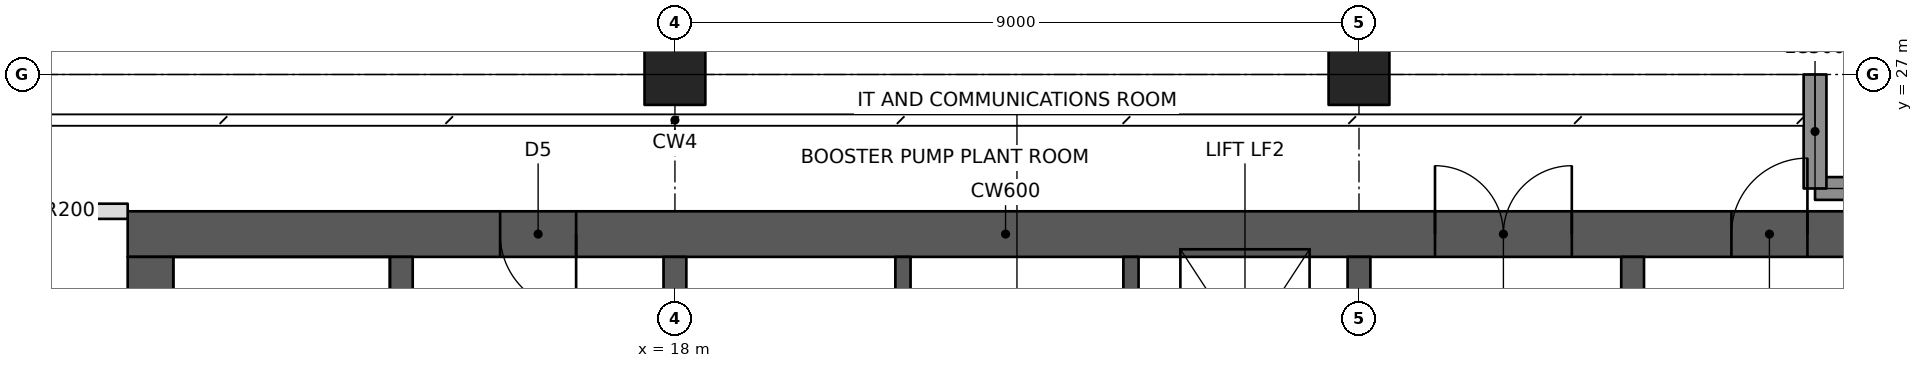
"""IFC4 building model, lengths in metres.
Left out: names, types, materials, properties, quantities, classifications, styles, units other than length and angle.
Written with IfcOpenShell. Run it as: python <this file> out.ifc"""

import sys

from ifc_helpers import new_model, si_unit, direction, frame, frame_2d, origin, origin_2d, place, context, subcontext, project, spatial, rectangle, hollow_rectangle, extrude, element, fill, save


model = new_model("IFC4")
c1 = context("Model", 3, precision=1e-05, world=origin(), true_north=direction((0.0, 1.0)))
c2 = subcontext(c1, "Body", "Model", "MODEL_VIEW")
j1 = project(units=[si_unit("LENGTHUNIT", "METRE"), si_unit("PLANEANGLEUNIT", "RADIAN")], contexts=[c1])
p1 = place(None, origin())
s1 = spatial("IfcSite", under=j1, at=p1, CompositionType="ELEMENT")
p2 = place(p1, origin())
s2 = spatial("IfcBuilding", under=s1, at=p2, CompositionType="ELEMENT")
p3 = place(p2, frame((0.0, 0.0, 274.8)))
s3 = spatial("IfcBuildingStorey", under=s2, at=p3, CompositionType="ELEMENT", Elevation=274.8)
for number, where, z_axis, x_axis in (
    (1, (18.0, 27.0, 0.0), (0.0, 0.0, 1.0), (1.0, 0.0, 0.0)),
    (2, (27.0, 27.0, 0.0), (0.0, 0.0, 1.0), (1.0, 0.0, 0.0)),
):
    element("IfcColumn", number, at=place(p3, frame(where, z_axis=z_axis, x_axis=x_axis)), inside=s3, PredefinedType="COLUMN", context=c2, shape_type="SweptSolid", body=[
        extrude(hollow_rectangle(XDim=0.8, YDim=0.8, WallThickness=0.025, at=origin_2d()), origin(), (0.0, 0.0, 1.0), 5.0),
    ])
p4 = place(p3, frame((10.8, 24.9, 0.0), z_axis=(0.0, 0.0, 1.0), x_axis=(1.0, 0.0, 0.0)))
e3 = element("IfcWall", 3, at=p4, inside=s3, PredefinedType="SHEAR", context=c2, shape_type="SweptSolid", body=[
    extrude(rectangle(XDim=23.4, YDim=0.6, at=frame_2d((11.7, 0.0))), origin(), (0.0, 0.0, 1.0), 4.7),
])
p5 = place(p4, frame((17.2, 0.0, 0.0)))
e4 = element("IfcOpeningElement", 4, at=p5, cuts=e3, PredefinedType="OPENING", context=c2, shape_type="SweptSolid", body=[
    extrude(rectangle(XDim=1.8, YDim=2.1, at=frame_2d((0.9, 1.05))), frame((0.0, 0.31, 0.0), z_axis=(0.0, -1.0, 0.0), x_axis=(1.0, 0.0, 0.0)), (0.0, 0.0, 1.0), 0.62),
])
p6 = place(p4, frame((21.1, 0.0, 0.0)))
e5 = element("IfcOpeningElement", 5, at=p6, cuts=e3, PredefinedType="OPENING", context=c2, shape_type="SweptSolid", body=[
    extrude(rectangle(XDim=1.0, YDim=2.1, at=frame_2d((0.5, 1.05))), frame((0.0, 0.31, 0.0), z_axis=(0.0, -1.0, 0.0), x_axis=(1.0, 0.0, 0.0)), (0.0, 0.0, 1.0), 0.62),
])
p7 = place(p4, frame((4.9, 0.0, 0.0)))
e6 = element("IfcOpeningElement", 6, at=p7, cuts=e3, PredefinedType="OPENING", context=c2, shape_type="SweptSolid", body=[
    extrude(rectangle(XDim=1.0, YDim=2.1, at=frame_2d((0.5, 1.05))), frame((0.0, 0.31, 0.0), z_axis=(0.0, -1.0, 0.0), x_axis=(1.0, 0.0, 0.0)), (0.0, 0.0, 1.0), 0.62),
])
p8 = place(p3, frame((11.1, 11.4, 0.0), z_axis=(0.0, 0.0, 1.0), x_axis=(0.0, 1.0, 0.0)))
e7 = element("IfcWall", 7, at=p8, inside=s3, PredefinedType="SHEAR", context=c2, shape_type="SweptSolid", body=[
    extrude(rectangle(XDim=13.2, YDim=0.6, at=frame_2d((6.6, 0.0))), origin(), (0.0, 0.0, 1.0), 4.7),
])
p9 = place(p3, frame((14.4, 11.4, 0.0), z_axis=(0.0, 0.0, 1.0), x_axis=(0.0, 1.0, 0.0)))
e8 = element("IfcWall", 8, at=p9, inside=s3, PredefinedType="SHEAR", context=c2, shape_type="SweptSolid", body=[
    extrude(rectangle(XDim=13.2, YDim=0.3, at=frame_2d((6.6, 0.0))), origin(), (0.0, 0.0, 1.0), 4.7),
])
p10 = place(p3, frame((18.0, 11.4, 0.0), z_axis=(0.0, 0.0, 1.0), x_axis=(0.0, 1.0, 0.0)))
e9 = element("IfcWall", 9, at=p10, inside=s3, PredefinedType="SHEAR", context=c2, shape_type="SweptSolid", body=[
    extrude(rectangle(XDim=13.2, YDim=0.3, at=frame_2d((6.6, 0.0))), origin(), (0.0, 0.0, 1.0), 4.7),
])
p11 = place(p10, frame((3.6, 0.0, 0.0)))
e10 = element("IfcOpeningElement", 10, at=p11, cuts=e9, PredefinedType="OPENING", context=c2, shape_type="SweptSolid", body=[
    extrude(rectangle(XDim=1.0, YDim=2.1, at=frame_2d((0.5, 1.05))), frame((0.0, 0.16, 0.0), z_axis=(0.0, -1.0, 0.0), x_axis=(1.0, 0.0, 0.0)), (0.0, 0.0, 1.0), 0.32),
])
p12 = place(p3, frame((27.0, 21.75, 0.0), z_axis=(0.0, 0.0, 1.0), x_axis=(0.0, 1.0, 0.0)))
e11 = element("IfcWall", 11, at=p12, inside=s3, PredefinedType="SHEAR", context=c2, shape_type="SweptSolid", body=[
    extrude(rectangle(XDim=2.85, YDim=0.3, at=frame_2d((1.425, 0.0))), origin(), (0.0, 0.0, 1.0), 4.7),
])
for number, where, z_axis, x_axis in (
    (12, (21.0, 21.75, 0.0), (0.0, 0.0, 1.0), (0.0, 1.0, 0.0)),
    (13, (24.0, 21.75, 0.0), (0.0, 0.0, 1.0), (0.0, 1.0, 0.0)),
):
    element("IfcWall", number, at=place(p3, frame(where, z_axis=z_axis, x_axis=x_axis)), inside=s3, PredefinedType="SHEAR", context=c2, shape_type="SweptSolid", body=[
        extrude(rectangle(XDim=2.85, YDim=0.2, at=frame_2d((1.425, 0.0))), origin(), (0.0, 0.0, 1.0), 4.7),
    ])
p13 = place(p3, frame((30.6, 11.4, 0.0), z_axis=(0.0, 0.0, 1.0), x_axis=(0.0, 1.0, 0.0)))
e14 = element("IfcWall", 14, at=p13, inside=s3, PredefinedType="SHEAR", context=c2, shape_type="SweptSolid", body=[
    extrude(rectangle(XDim=13.2, YDim=0.3, at=frame_2d((6.6, 0.0))), origin(), (0.0, 0.0, 1.0), 4.7),
])
p14 = place(p3, frame((34.5, 25.5, 0.0), z_axis=(0.0, 0.0, 1.0), x_axis=(-1.0, 0.0, 0.0)))
e15 = element("IfcWall", 15, at=p14, inside=s3, PredefinedType="SOLIDWALL", context=c2, shape_type="SweptSolid", body=[
    extrude(rectangle(XDim=1.5, YDim=0.3, at=frame_2d((0.75, 0.0))), origin(), (0.0, 0.0, 1.0), 4.7),
])
p15 = place(p3, frame((33.0, 25.5, 0.0), z_axis=(0.0, 0.0, 1.0), x_axis=(0.0, 1.0, 0.0)))
e16 = element("IfcWall", 16, at=p15, inside=s3, PredefinedType="SOLIDWALL", context=c2, shape_type="SweptSolid", body=[
    extrude(rectangle(XDim=1.5, YDim=0.3, at=frame_2d((0.75, 0.0))), origin(), (0.0, 0.0, 1.0), 3.92),
])
p16 = place(p3, frame((9.1, 25.2, 0.0), z_axis=(0.0, 0.0, 1.0), x_axis=(1.0, 0.0, 0.0)))
e17 = element("IfcWall", 17, at=p16, inside=s3, PredefinedType="PARTITIONING", context=c2, shape_type="SweptSolid", body=[
    extrude(rectangle(XDim=1.7, YDim=0.2, at=frame_2d((0.85, 0.0))), origin(), (0.0, 0.0, 1.0), 3.938),
])
p17 = place(p5, origin())
e18 = element("IfcDoor", 18, at=p17, inside=s3, OperationType="DOUBLE_DOOR_SINGLE_SWING", PredefinedType="DOOR", context=c2, shape_type="SweptSolid", body=[
    extrude(rectangle(XDim=1.8, YDim=2.1, at=frame_2d((0.9, 1.05))), frame((0.0, 0.025, 0.0), z_axis=(0.0, -1.0, 0.0), x_axis=(1.0, 0.0, 0.0)), (0.0, 0.0, 1.0), 0.05),
])
fill(e4, e18)
p18 = place(p6, origin())
e19 = element("IfcDoor", 19, at=p18, inside=s3, OperationType="SINGLE_SWING_RIGHT", PredefinedType="DOOR", context=c2, shape_type="SweptSolid", body=[
    extrude(rectangle(XDim=1.0, YDim=2.1, at=frame_2d((0.5, 1.05))), frame((0.0, 0.025, 0.0), z_axis=(0.0, -1.0, 0.0), x_axis=(1.0, 0.0, 0.0)), (0.0, 0.0, 1.0), 0.05),
])
fill(e5, e19)
p19 = place(p7, frame((1.0, 0.0, 0.0), z_axis=(0.0, 0.0, 1.0), x_axis=(-1.0, 0.0, 0.0)))
e20 = element("IfcDoor", 20, at=p19, inside=s3, OperationType="SINGLE_SWING_LEFT", PredefinedType="DOOR", context=c2, shape_type="SweptSolid", body=[
    extrude(rectangle(XDim=1.0, YDim=2.1, at=frame_2d((0.5, 1.05))), frame((0.0, 0.025, 0.0), z_axis=(0.0, -1.0, 0.0), x_axis=(1.0, 0.0, 0.0)), (0.0, 0.0, 1.0), 0.05),
])
fill(e6, e20)
save(model, sys.argv[1])
